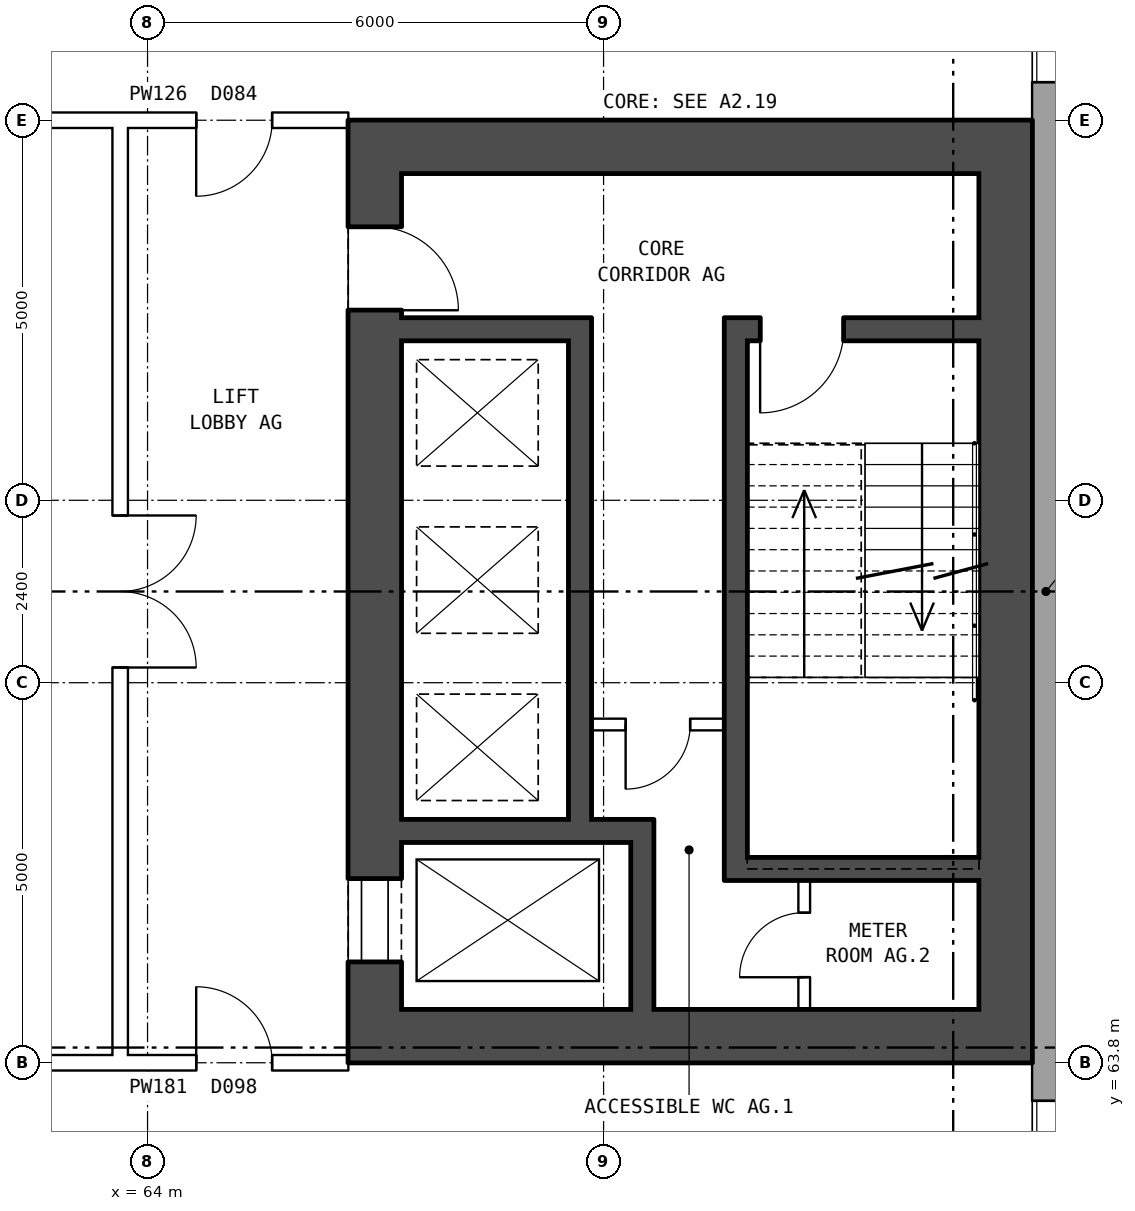
"""IFC4 building model, lengths in metres.
Left out: names, types, materials, properties, quantities, classifications, styles, units other than length and angle.
Written with IfcOpenShell. Run it as: python <this file> out.ifc"""

import sys

from ifc_helpers import new_model, si_unit, direction, frame, frame_2d, origin, place, context, subcontext, project, spatial, rectangle, extrude, element, fill, save


model = new_model("IFC4")
c1 = context("Model", 3, precision=1e-05, world=origin(), true_north=direction((0.0, 1.0)))
c2 = subcontext(c1, "Body", "Model", "MODEL_VIEW")
j1 = project(units=[si_unit("LENGTHUNIT", "METRE"), si_unit("PLANEANGLEUNIT", "RADIAN")], contexts=[c1])
p1 = place(None, origin())
s1 = spatial("IfcSite", under=j1, at=p1, CompositionType="ELEMENT")
p2 = place(p1, origin())
s2 = spatial("IfcBuilding", under=s1, at=p2, CompositionType="ELEMENT")
p3 = place(p2, frame((0.0, 0.0, 67.4)))
s3 = spatial("IfcBuildingStorey", under=s2, at=p3, CompositionType="ELEMENT", Elevation=67.4)
p4 = place(p3, frame((75.82, 57.075, 0.0), z_axis=(0.0, 0.0, 1.0), x_axis=(0.0, 1.0, 0.0)))
e1 = element("IfcWall", 1, at=p4, inside=s3, PredefinedType="STANDARD", context=c2, shape_type="SweptSolid", body=[
    extrude(rectangle(XDim=25.851, YDim=0.36, at=frame_2d((12.925, 0.0))), origin(), (0.0, 0.0, 1.0), 3.6),
])
p5 = place(p4, frame((1.625, 0.0, 0.8)))
e2 = element("IfcOpeningElement", 2, at=p5, cuts=e1, PredefinedType="OPENING", context=c2, shape_type="SweptSolid", body=[
    extrude(rectangle(XDim=1.6, YDim=1.8, at=frame_2d((0.8, 0.9))), frame((0.0, 0.19, 0.0), z_axis=(0.0, -1.0, 0.0), x_axis=(1.0, 0.0, 0.0)), (0.0, 0.0, 1.0), 0.38),
])
p6 = place(p4, frame((4.625, 0.0, 0.8)))
e3 = element("IfcOpeningElement", 3, at=p6, cuts=e1, PredefinedType="OPENING", context=c2, shape_type="SweptSolid", body=[
    extrude(rectangle(XDim=1.6, YDim=1.8, at=frame_2d((0.8, 0.9))), frame((0.0, 0.19, 0.0), z_axis=(0.0, -1.0, 0.0), x_axis=(1.0, 0.0, 0.0)), (0.0, 0.0, 1.0), 0.38),
])
p7 = place(p4, frame((19.625, 0.0, 0.8)))
e4 = element("IfcOpeningElement", 4, at=p7, cuts=e1, PredefinedType="OPENING", context=c2, shape_type="SweptSolid", body=[
    extrude(rectangle(XDim=1.6, YDim=1.8, at=frame_2d((0.8, 0.9))), frame((0.0, 0.19, 0.0), z_axis=(0.0, -1.0, 0.0), x_axis=(1.0, 0.0, 0.0)), (0.0, 0.0, 1.0), 0.38),
])
p8 = place(p4, frame((22.625, 0.0, 0.8)))
e5 = element("IfcOpeningElement", 5, at=p8, cuts=e1, PredefinedType="OPENING", context=c2, shape_type="SweptSolid", body=[
    extrude(rectangle(XDim=1.6, YDim=1.8, at=frame_2d((0.8, 0.9))), frame((0.0, 0.19, 0.0), z_axis=(0.0, -1.0, 0.0), x_axis=(1.0, 0.0, 0.0)), (0.0, 0.0, 1.0), 0.38),
])
p9 = place(p3, frame((66.99, 64.5, 0.0), z_axis=(0.0, 0.0, 1.0), x_axis=(0.0, 1.0, 0.0)))
e6 = element("IfcWall", 6, at=p9, inside=s3, PredefinedType="SHEAR", context=c2, shape_type="SweptSolid", body=[
    extrude(rectangle(XDim=11.0, YDim=0.7, at=frame_2d((5.5, 0.0))), origin(), (0.0, 0.0, 1.0), 3.6),
])
p10 = place(p9, frame((0.625, 0.0, 0.0)))
e7 = element("IfcOpeningElement", 7, at=p10, cuts=e6, PredefinedType="OPENING", context=c2, shape_type="SweptSolid", body=[
    extrude(rectangle(XDim=1.1, YDim=2.1, at=frame_2d((0.55, 1.05))), frame((0.0, 0.36, 0.0), z_axis=(0.0, -1.0, 0.0), x_axis=(1.0, 0.0, 0.0)), (0.0, 0.0, 1.0), 0.72),
])
p11 = place(p9, frame((9.2, 0.0, 0.0)))
e8 = element("IfcOpeningElement", 8, at=p11, cuts=e6, PredefinedType="OPENING", context=c2, shape_type="SweptSolid", body=[
    extrude(rectangle(XDim=1.1, YDim=2.1, at=frame_2d((0.55, 1.05))), frame((0.0, 0.36, 0.0), z_axis=(0.0, -1.0, 0.0), x_axis=(1.0, 0.0, 0.0)), (0.0, 0.0, 1.0), 0.72),
])
p12 = place(p3, frame((75.29, 64.5, 0.0), z_axis=(0.0, 0.0, 1.0), x_axis=(0.0, 1.0, 0.0)))
e9 = element("IfcWall", 9, at=p12, inside=s3, PredefinedType="SHEAR", context=c2, shape_type="SweptSolid", body=[
    extrude(rectangle(XDim=11.0, YDim=0.7, at=frame_2d((5.5, 0.0))), origin(), (0.0, 0.0, 1.0), 3.6),
])
for number, where, z_axis, x_axis in (
    (10, (66.64, 64.15, 0.0), (0.0, 0.0, 1.0), (1.0, 0.0, 0.0)),
    (11, (66.64, 75.85, 0.0), (0.0, 0.0, 1.0), (1.0, 0.0, 0.0)),
):
    element("IfcWall", number, at=place(p3, frame(where, z_axis=z_axis, x_axis=x_axis)), inside=s3, PredefinedType="SHEAR", context=c2, shape_type="SweptSolid", body=[
        extrude(rectangle(XDim=9.0, YDim=0.7, at=frame_2d((4.5, 0.0))), origin(), (0.0, 0.0, 1.0), 3.6),
    ])
p13 = place(p3, frame((71.89, 66.35, 0.0), z_axis=(0.0, 0.0, 1.0), x_axis=(1.0, 0.0, 0.0)))
e12 = element("IfcWall", 12, at=p13, inside=s3, PredefinedType="SHEAR", context=c2, shape_type="SweptSolid", body=[
    extrude(rectangle(XDim=3.05, YDim=0.3, at=frame_2d((1.525, 0.0))), origin(), (0.0, 0.0, 1.0), 3.6),
])
p14 = place(p3, frame((67.34, 66.85, 0.0), z_axis=(0.0, 0.0, 1.0), x_axis=(1.0, 0.0, 0.0)))
e13 = element("IfcWall", 13, at=p14, inside=s3, PredefinedType="SHEAR", context=c2, shape_type="SweptSolid", body=[
    extrude(rectangle(XDim=3.32, YDim=0.3, at=frame_2d((1.66, 0.0))), origin(), (0.0, 0.0, 1.0), 3.6),
])
p15 = place(p3, frame((69.84, 68.25, 0.0), z_axis=(0.0, 0.0, 1.0), x_axis=(1.0, 0.0, 0.0)))
e14 = element("IfcWall", 14, at=p15, inside=s3, PredefinedType="PARTITIONING", context=c2, shape_type="SweptSolid", body=[
    extrude(rectangle(XDim=1.75, YDim=0.15, at=frame_2d((0.875, 0.0))), origin(), (0.0, 0.0, 1.0), 3.6),
])
p16 = place(p15, frame((0.45, 0.0, 0.0)))
e15 = element("IfcOpeningElement", 15, at=p16, cuts=e14, PredefinedType="OPENING", context=c2, shape_type="SweptSolid", body=[
    extrude(rectangle(XDim=0.85, YDim=2.1, at=frame_2d((0.425, 1.05))), frame((0.0, 0.085, 0.0), z_axis=(0.0, -1.0, 0.0), x_axis=(1.0, 0.0, 0.0)), (0.0, 0.0, 1.0), 0.17),
])
p17 = place(p3, frame((67.34, 73.45, 0.0), z_axis=(0.0, 0.0, 1.0), x_axis=(1.0, 0.0, 0.0)))
e16 = element("IfcWall", 16, at=p17, inside=s3, PredefinedType="SHEAR", context=c2, shape_type="SweptSolid", body=[
    extrude(rectangle(XDim=2.2, YDim=0.3, at=frame_2d((1.1, 0.0))), origin(), (0.0, 0.0, 1.0), 3.6),
])
p18 = place(p3, frame((71.89, 73.45, 0.0), z_axis=(0.0, 0.0, 1.0), x_axis=(1.0, 0.0, 0.0)))
e17 = element("IfcWall", 17, at=p18, inside=s3, PredefinedType="SHEAR", context=c2, shape_type="SweptSolid", body=[
    extrude(rectangle(XDim=3.05, YDim=0.3, at=frame_2d((1.525, 0.0))), origin(), (0.0, 0.0, 1.0), 3.6),
])
p19 = place(p18, frame((0.17, 0.0, 0.0)))
e18 = element("IfcOpeningElement", 18, at=p19, cuts=e17, PredefinedType="OPENING", context=c2, shape_type="SweptSolid", body=[
    extrude(rectangle(XDim=1.1, YDim=2.1, at=frame_2d((0.55, 1.05))), frame((0.0, 0.16, 0.0), z_axis=(0.0, -1.0, 0.0), x_axis=(1.0, 0.0, 0.0)), (0.0, 0.0, 1.0), 0.32),
])
p20 = place(p3, frame((69.69, 67.0, 0.0), z_axis=(0.0, 0.0, 1.0), x_axis=(0.0, 1.0, 0.0)))
e19 = element("IfcWall", 19, at=p20, inside=s3, PredefinedType="SHEAR", context=c2, shape_type="SweptSolid", body=[
    extrude(rectangle(XDim=6.6, YDim=0.3, at=frame_2d((3.3, 0.0))), origin(), (0.0, 0.0, 1.0), 3.6),
])
p21 = place(p3, frame((70.51, 64.5, 0.0), z_axis=(0.0, 0.0, 1.0), x_axis=(0.0, 1.0, 0.0)))
e20 = element("IfcWall", 20, at=p21, inside=s3, PredefinedType="SHEAR", context=c2, shape_type="SweptSolid", body=[
    extrude(rectangle(XDim=2.2, YDim=0.3, at=frame_2d((1.1, 0.0))), origin(), (0.0, 0.0, 1.0), 3.6),
])
p22 = place(p3, frame((71.74, 66.2, 0.0), z_axis=(0.0, 0.0, 1.0), x_axis=(0.0, 1.0, 0.0)))
e21 = element("IfcWall", 21, at=p22, inside=s3, PredefinedType="SHEAR", context=c2, shape_type="SweptSolid", body=[
    extrude(rectangle(XDim=7.4, YDim=0.3, at=frame_2d((3.7, 0.0))), origin(), (0.0, 0.0, 1.0), 3.6),
])
p23 = place(p3, frame((72.64, 64.5, 0.0), z_axis=(0.0, 0.0, 1.0), x_axis=(0.0, 1.0, 0.0)))
e22 = element("IfcWall", 22, at=p23, inside=s3, PredefinedType="PARTITIONING", context=c2, shape_type="SweptSolid", body=[
    extrude(rectangle(XDim=1.7, YDim=0.15, at=frame_2d((0.85, 0.0))), origin(), (0.0, 0.0, 1.0), 3.6),
])
p24 = place(p23, frame((0.425, 0.0, 0.0)))
e23 = element("IfcOpeningElement", 23, at=p24, cuts=e22, PredefinedType="OPENING", context=c2, shape_type="SweptSolid", body=[
    extrude(rectangle(XDim=0.85, YDim=2.1, at=frame_2d((0.425, 1.05))), frame((0.0, 0.085, 0.0), z_axis=(0.0, -1.0, 0.0), x_axis=(1.0, 0.0, 0.0)), (0.0, 0.0, 1.0), 0.17),
])
p25 = place(p3, frame((63.64, 63.9, 0.0), z_axis=(0.0, 0.0, 1.0), x_axis=(0.0, 1.0, 0.0)))
e24 = element("IfcWall", 24, at=p25, inside=s3, PredefinedType="PARTITIONING", context=c2, shape_type="SweptSolid", body=[
    extrude(rectangle(XDim=12.2, YDim=0.2, at=frame_2d((6.1, 0.0))), origin(), (0.0, 0.0, 1.0), 3.6),
])
p26 = place(p25, frame((5.1, 0.0, 0.0)))
e25 = element("IfcOpeningElement", 25, at=p26, cuts=e24, PredefinedType="OPENING", context=c2, shape_type="SweptSolid", body=[
    extrude(rectangle(XDim=2.0, YDim=2.1, at=frame_2d((1.0, 1.05))), frame((0.0, 0.11, 0.0), z_axis=(0.0, -1.0, 0.0), x_axis=(1.0, 0.0, 0.0)), (0.0, 0.0, 1.0), 0.22),
])
p27 = place(p3, frame((44.36, 63.8, 0.0), z_axis=(0.0, 0.0, 1.0), x_axis=(1.0, 0.0, 0.0)))
e26 = element("IfcWall", 26, at=p27, inside=s3, PredefinedType="PARTITIONING", context=c2, shape_type="SweptSolid", body=[
    extrude(rectangle(XDim=19.28, YDim=0.2, at=frame_2d((9.64, 0.0))), origin(), (0.0, 0.0, 1.0), 3.6),
])
p28 = place(p27, frame((8.74, 0.0, 0.0)))
e27 = element("IfcOpeningElement", 27, at=p28, cuts=e26, PredefinedType="OPENING", context=c2, shape_type="SweptSolid", body=[
    extrude(rectangle(XDim=1.8, YDim=2.1, at=frame_2d((0.9, 1.05))), frame((0.0, 0.11, 0.0), z_axis=(0.0, -1.0, 0.0), x_axis=(1.0, 0.0, 0.0)), (0.0, 0.0, 1.0), 0.22),
])
p29 = place(p3, frame((63.64, 63.8, 0.0), z_axis=(0.0, 0.0, 1.0), x_axis=(1.0, 0.0, 0.0)))
e28 = element("IfcWall", 28, at=p29, inside=s3, PredefinedType="PARTITIONING", context=c2, shape_type="SweptSolid", body=[
    extrude(rectangle(XDim=3.0, YDim=0.2, at=frame_2d((1.5, 0.0))), origin(), (0.0, 0.0, 1.0), 3.6),
])
p30 = place(p29, frame((1.0, 0.0, 0.0)))
e29 = element("IfcOpeningElement", 29, at=p30, cuts=e28, PredefinedType="OPENING", context=c2, shape_type="SweptSolid", body=[
    extrude(rectangle(XDim=1.0, YDim=2.1, at=frame_2d((0.5, 1.05))), frame((0.0, 0.11, 0.0), z_axis=(0.0, -1.0, 0.0), x_axis=(1.0, 0.0, 0.0)), (0.0, 0.0, 1.0), 0.22),
])
p31 = place(p3, frame((44.36, 76.2, 0.0), z_axis=(0.0, 0.0, 1.0), x_axis=(1.0, 0.0, 0.0)))
e30 = element("IfcWall", 30, at=p31, inside=s3, PredefinedType="PARTITIONING", context=c2, shape_type="SweptSolid", body=[
    extrude(rectangle(XDim=19.28, YDim=0.2, at=frame_2d((9.64, 0.0))), origin(), (0.0, 0.0, 1.0), 3.6),
])
p32 = place(p31, frame((8.74, 0.0, 0.0)))
e31 = element("IfcOpeningElement", 31, at=p32, cuts=e30, PredefinedType="OPENING", context=c2, shape_type="SweptSolid", body=[
    extrude(rectangle(XDim=1.8, YDim=2.1, at=frame_2d((0.9, 1.05))), frame((0.0, 0.11, 0.0), z_axis=(0.0, -1.0, 0.0), x_axis=(1.0, 0.0, 0.0)), (0.0, 0.0, 1.0), 0.22),
])
p33 = place(p3, frame((63.64, 76.2, 0.0), z_axis=(0.0, 0.0, 1.0), x_axis=(1.0, 0.0, 0.0)))
e32 = element("IfcWall", 32, at=p33, inside=s3, PredefinedType="PARTITIONING", context=c2, shape_type="SweptSolid", body=[
    extrude(rectangle(XDim=3.0, YDim=0.2, at=frame_2d((1.5, 0.0))), origin(), (0.0, 0.0, 1.0), 3.6),
])
p34 = place(p33, frame((1.0, 0.0, 0.0)))
e33 = element("IfcOpeningElement", 33, at=p34, cuts=e32, PredefinedType="OPENING", context=c2, shape_type="SweptSolid", body=[
    extrude(rectangle(XDim=1.0, YDim=2.1, at=frame_2d((0.5, 1.05))), frame((0.0, 0.11, 0.0), z_axis=(0.0, -1.0, 0.0), x_axis=(1.0, 0.0, 0.0)), (0.0, 0.0, 1.0), 0.22),
])
p35 = place(p6, origin())
e34 = element("IfcWindow", 34, at=p35, inside=s3, PartitioningType="SINGLE_PANEL", PredefinedType="WINDOW", context=c2, shape_type="SweptSolid", body=[
    extrude(rectangle(XDim=1.6, YDim=1.8, at=frame_2d((0.8, 0.9))), frame((0.0, 0.15, 0.0), z_axis=(0.0, -1.0, 0.0), x_axis=(1.0, 0.0, 0.0)), (0.0, 0.0, 1.0), 0.06),
])
fill(e3, e34)
p36 = place(p7, origin())
e35 = element("IfcWindow", 35, at=p36, inside=s3, PartitioningType="SINGLE_PANEL", PredefinedType="WINDOW", context=c2, shape_type="SweptSolid", body=[
    extrude(rectangle(XDim=1.6, YDim=1.8, at=frame_2d((0.8, 0.9))), frame((0.0, 0.15, 0.0), z_axis=(0.0, -1.0, 0.0), x_axis=(1.0, 0.0, 0.0)), (0.0, 0.0, 1.0), 0.06),
])
fill(e4, e35)
p37 = place(p10, origin())
e36 = element("IfcDoor", 36, at=p37, inside=s3, OperationType="DOUBLE_DOOR_SLIDING", PredefinedType="DOOR", context=c2, shape_type="SweptSolid", body=[
    extrude(rectangle(XDim=1.1, YDim=2.1, at=frame_2d((0.55, 1.05))), frame((0.0, -0.285, 0.0), z_axis=(0.0, -1.0, 0.0), x_axis=(1.0, 0.0, 0.0)), (0.0, 0.0, 1.0), 0.05),
])
fill(e7, e36)
p38 = place(p11, frame((1.1, 0.0, 0.0), z_axis=(0.0, 0.0, 1.0), x_axis=(-1.0, 0.0, 0.0)))
e37 = element("IfcDoor", 37, at=p38, inside=s3, OperationType="SINGLE_SWING_RIGHT", PredefinedType="DOOR", context=c2, shape_type="SweptSolid", body=[
    extrude(rectangle(XDim=1.1, YDim=2.1, at=frame_2d((0.55, 1.05))), frame((0.0, 0.335, 0.0), z_axis=(0.0, -1.0, 0.0), x_axis=(1.0, 0.0, 0.0)), (0.0, 0.0, 1.0), 0.05),
])
fill(e8, e37)
p39 = place(p19, frame((1.1, 0.0, 0.0), z_axis=(0.0, 0.0, 1.0), x_axis=(-1.0, 0.0, 0.0)))
e38 = element("IfcDoor", 38, at=p39, inside=s3, OperationType="SINGLE_SWING_RIGHT", PredefinedType="DOOR", context=c2, shape_type="SweptSolid", body=[
    extrude(rectangle(XDim=1.1, YDim=2.1, at=frame_2d((0.55, 1.05))), frame((0.0, 0.025, 0.0), z_axis=(0.0, -1.0, 0.0), x_axis=(1.0, 0.0, 0.0)), (0.0, 0.0, 1.0), 0.05),
])
fill(e18, e38)
p40 = place(p16, frame((0.85, 0.0, 0.0), z_axis=(0.0, 0.0, 1.0), x_axis=(-1.0, 0.0, 0.0)))
e39 = element("IfcDoor", 39, at=p40, inside=s3, OperationType="SINGLE_SWING_RIGHT", PredefinedType="DOOR", context=c2, shape_type="SweptSolid", body=[
    extrude(rectangle(XDim=0.85, YDim=2.1, at=frame_2d((0.425, 1.05))), frame((0.0, 0.025, 0.0), z_axis=(0.0, -1.0, 0.0), x_axis=(1.0, 0.0, 0.0)), (0.0, 0.0, 1.0), 0.05),
])
fill(e15, e39)
p41 = place(p24, origin())
e40 = element("IfcDoor", 40, at=p41, inside=s3, OperationType="SINGLE_SWING_LEFT", PredefinedType="DOOR", context=c2, shape_type="SweptSolid", body=[
    extrude(rectangle(XDim=0.85, YDim=2.1, at=frame_2d((0.425, 1.05))), frame((0.0, 0.025, 0.0), z_axis=(0.0, -1.0, 0.0), x_axis=(1.0, 0.0, 0.0)), (0.0, 0.0, 1.0), 0.05),
])
fill(e23, e40)
p42 = place(p26, frame((2.0, 0.0, 0.0), z_axis=(0.0, 0.0, 1.0), x_axis=(-1.0, 0.0, 0.0)))
e41 = element("IfcDoor", 41, at=p42, inside=s3, OperationType="DOUBLE_DOOR_SINGLE_SWING", PredefinedType="DOOR", context=c2, shape_type="SweptSolid", body=[
    extrude(rectangle(XDim=2.0, YDim=2.1, at=frame_2d((1.0, 1.05))), frame((0.0, 0.025, 0.0), z_axis=(0.0, -1.0, 0.0), x_axis=(1.0, 0.0, 0.0)), (0.0, 0.0, 1.0), 0.05),
])
fill(e25, e41)
p43 = place(p30, origin())
e42 = element("IfcDoor", 42, at=p43, inside=s3, OperationType="SINGLE_SWING_LEFT", PredefinedType="DOOR", context=c2, shape_type="SweptSolid", body=[
    extrude(rectangle(XDim=1.0, YDim=2.1, at=frame_2d((0.5, 1.05))), frame((0.0, 0.025, 0.0), z_axis=(0.0, -1.0, 0.0), x_axis=(1.0, 0.0, 0.0)), (0.0, 0.0, 1.0), 0.05),
])
fill(e29, e42)
p44 = place(p34, frame((1.0, 0.0, 0.0), z_axis=(0.0, 0.0, 1.0), x_axis=(-1.0, 0.0, 0.0)))
e43 = element("IfcDoor", 43, at=p44, inside=s3, OperationType="SINGLE_SWING_RIGHT", PredefinedType="DOOR", context=c2, shape_type="SweptSolid", body=[
    extrude(rectangle(XDim=1.0, YDim=2.1, at=frame_2d((0.5, 1.05))), frame((0.0, 0.025, 0.0), z_axis=(0.0, -1.0, 0.0), x_axis=(1.0, 0.0, 0.0)), (0.0, 0.0, 1.0), 0.05),
])
fill(e33, e43)
save(model, sys.argv[1])
